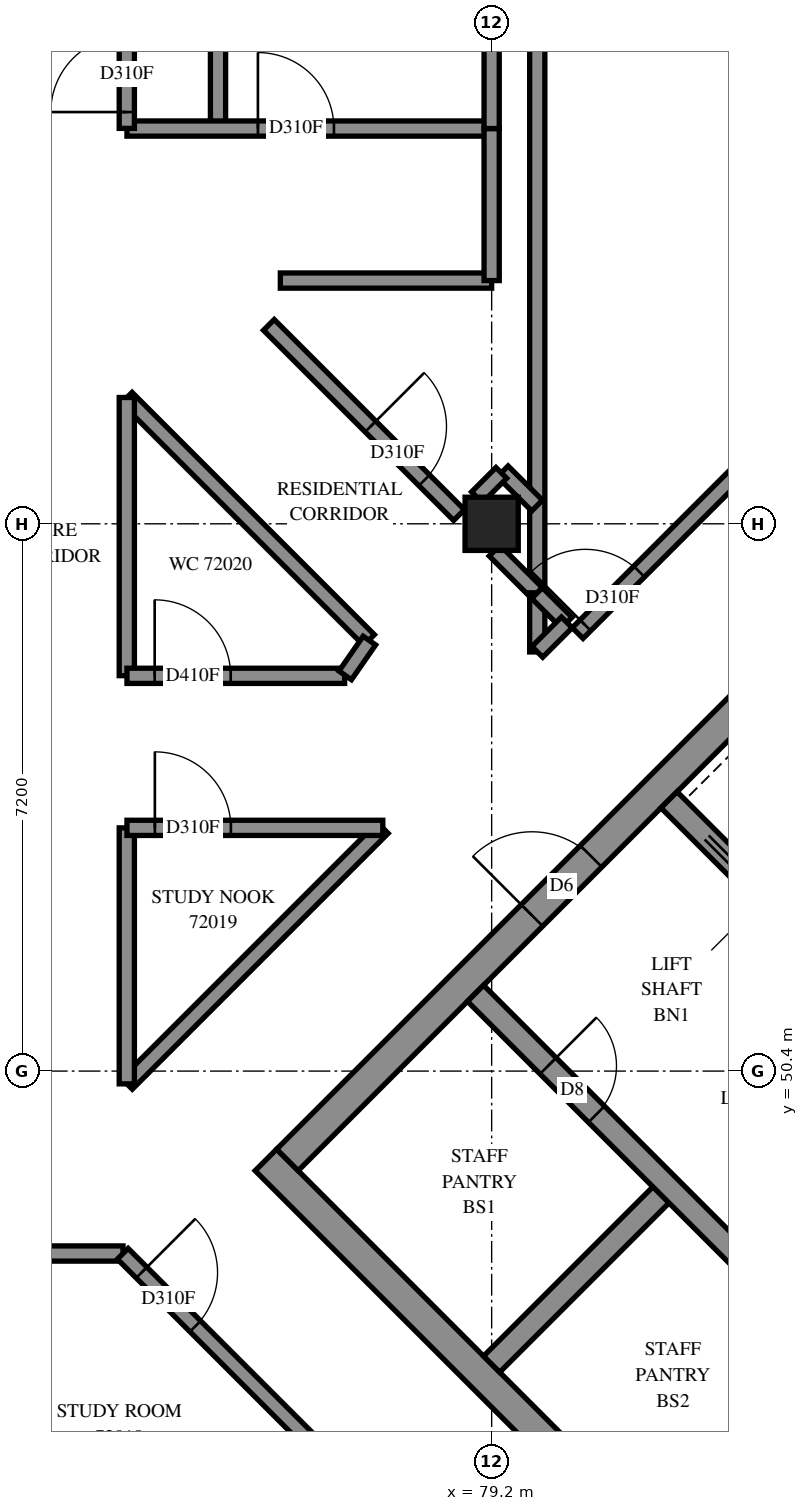
"""IFC4 building model, lengths in metres.
Left out: names, types, materials, properties, quantities, classifications, styles, units other than length and angle.
Written with IfcOpenShell. Run it as: python <this file> out.ifc"""

import sys

from ifc_helpers import new_model, si_unit, direction, frame, frame_2d, origin, origin_2d, place, context, subcontext, project, spatial, rectangle, extrude, element, fill, save


model = new_model("IFC4")
c1 = context("Model", 3, precision=1e-05, world=origin(), true_north=direction((0.0, 1.0)))
c2 = subcontext(c1, "Body", "Model", "MODEL_VIEW")
j1 = project(units=[si_unit("LENGTHUNIT", "METRE"), si_unit("PLANEANGLEUNIT", "RADIAN")], contexts=[c1])
p1 = place(None, origin())
s1 = spatial("IfcSite", under=j1, at=p1, CompositionType="ELEMENT")
p2 = place(p1, origin())
s2 = spatial("IfcBuilding", under=s1, at=p2, CompositionType="ELEMENT")
p3 = place(p2, frame((0.0, 0.0, 264.2)))
s3 = spatial("IfcBuildingStorey", under=s2, at=p3, CompositionType="ELEMENT", Elevation=264.2)
p4 = place(p3, frame((79.2, 57.6, 0.0), z_axis=(0.0, 0.0, 1.0), x_axis=(1.0, 0.0, 0.0)))
e1 = element("IfcColumn", 1, at=p4, inside=s3, PredefinedType="COLUMN", context=c2, shape_type="SweptSolid", body=[
    extrude(rectangle(XDim=0.7, YDim=0.7, at=origin_2d()), origin(), (0.0, 0.0, 1.0), 3.1),
])
p5 = place(p3, frame((76.23, 49.231, -0.3), z_axis=(0.0, 0.0, 1.0), x_axis=(0.7071034917, -0.7071100706, 0.0)))
e2 = element("IfcWall", 2, at=p5, inside=s3, PredefinedType="SHEAR", context=c2, shape_type="SweptSolid", body=[
    extrude(rectangle(XDim=15.2, YDim=0.4, at=frame_2d((7.6, 0.0))), origin(), (0.0, 0.0, 1.0), 2.7),
])
p6 = place(p3, frame((76.513, 49.231, -0.3), z_axis=(0.0, 0.0, 1.0), x_axis=(0.7071067812, 0.7071067812, 0.0)))
e3 = element("IfcWall", 3, at=p6, inside=s3, PredefinedType="SHEAR", context=c2, shape_type="SweptSolid", body=[
    extrude(rectangle(XDim=14.4, YDim=0.4, at=frame_2d((7.2, 0.0))), origin(), (0.0, 0.0, 1.0), 2.7),
])
p7 = place(p6, frame((4.55, 0.0, 0.3)))
e4 = element("IfcOpeningElement", 4, at=p7, cuts=e3, PredefinedType="OPENING", context=c2, shape_type="SweptSolid", body=[
    extrude(rectangle(XDim=1.1, YDim=2.1, at=frame_2d((0.55, 1.05))), frame((0.0, 0.21, 0.0), z_axis=(0.0, -1.0, 0.0), x_axis=(1.0, 0.0, 0.0)), (0.0, 0.0, 1.0), 0.42),
])
p8 = place(p6, frame((11.35, 0.0, 0.3)))
e5 = element("IfcOpeningElement", 5, at=p8, cuts=e3, PredefinedType="OPENING", context=c2, shape_type="SweptSolid", body=[
    extrude(rectangle(XDim=1.1, YDim=2.1, at=frame_2d((0.55, 1.05))), frame((0.0, 0.21, 0.0), z_axis=(0.0, -1.0, 0.0), x_axis=(1.0, 0.0, 0.0)), (0.0, 0.0, 1.0), 0.42),
])
p9 = place(p3, frame((79.2, 46.544, 0.0), z_axis=(0.0, 0.0, 1.0), x_axis=(0.7071219326, 0.7070916295, 0.0)))
e6 = element("IfcWall", 6, at=p9, inside=s3, PredefinedType="SOLIDWALL", context=c2, shape_type="SweptSolid", body=[
    extrude(rectangle(XDim=3.3, YDim=0.3, at=frame_2d((1.65, 0.0))), origin(), (0.0, 0.0, 1.0), 3.1),
])
p10 = place(p3, frame((81.746, 43.999, 0.0), z_axis=(0.0, 0.0, 1.0), x_axis=(0.7071067812, 0.7071067812, 0.0)))
e7 = element("IfcWall", 7, at=p10, inside=s3, PredefinedType="SOLIDWALL", context=c2, shape_type="SweptSolid", body=[
    extrude(rectangle(XDim=3.3, YDim=0.3, at=frame_2d((1.65, 0.0))), origin(), (0.0, 0.0, 1.0), 3.1),
])
p11 = place(p3, frame((78.988, 51.423, 0.0), z_axis=(0.0, 0.0, 1.0), x_axis=(0.7071067812, -0.7071067812, 0.0)))
e8 = element("IfcWall", 8, at=p11, inside=s3, PredefinedType="SOLIDWALL", context=c2, shape_type="SweptSolid", body=[
    extrude(rectangle(XDim=14.4, YDim=0.3, at=frame_2d((7.2, 0.0))), origin(), (0.0, 0.0, 1.0), 3.1),
])
p12 = place(p11, frame((1.35, 0.0, 0.0)))
e9 = element("IfcOpeningElement", 9, at=p12, cuts=e8, PredefinedType="OPENING", context=c2, shape_type="SweptSolid", body=[
    extrude(rectangle(XDim=0.9, YDim=2.1, at=frame_2d((0.45, 1.05))), frame((0.0, 0.16, 0.0), z_axis=(0.0, -1.0, 0.0), x_axis=(1.0, 0.0, 0.0)), (0.0, 0.0, 1.0), 0.32),
])
p13 = place(p11, frame((4.95, 0.0, 0.0)))
e10 = element("IfcOpeningElement", 10, at=p13, cuts=e8, PredefinedType="OPENING", context=c2, shape_type="SweptSolid", body=[
    extrude(rectangle(XDim=0.9, YDim=2.1, at=frame_2d((0.45, 1.05))), frame((0.0, 0.16, 0.0), z_axis=(0.0, -1.0, 0.0), x_axis=(1.0, 0.0, 0.0)), (0.0, 0.0, 1.0), 0.32),
])
p14 = place(p11, frame((8.55, 0.0, 0.0)))
e11 = element("IfcOpeningElement", 11, at=p14, cuts=e8, PredefinedType="OPENING", context=c2, shape_type="SweptSolid", body=[
    extrude(rectangle(XDim=0.9, YDim=2.1, at=frame_2d((0.45, 1.05))), frame((0.0, 0.16, 0.0), z_axis=(0.0, -1.0, 0.0), x_axis=(1.0, 0.0, 0.0)), (0.0, 0.0, 1.0), 0.32),
])
p15 = place(p11, frame((12.05, 0.0, 0.0)))
e12 = element("IfcOpeningElement", 12, at=p15, cuts=e8, PredefinedType="OPENING", context=c2, shape_type="SweptSolid", body=[
    extrude(rectangle(XDim=1.1, YDim=2.1, at=frame_2d((0.55, 1.05))), frame((0.0, 0.16, 0.0), z_axis=(0.0, -1.0, 0.0), x_axis=(1.0, 0.0, 0.0)), (0.0, 0.0, 1.0), 0.32),
])
p16 = place(p3, frame((81.534, 53.969, 0.0), z_axis=(0.0, 0.0, 1.0), x_axis=(0.707103309, -0.7071102534, 0.0)))
e13 = element("IfcWall", 13, at=p16, inside=s3, PredefinedType="SOLIDWALL", context=c2, shape_type="SweptSolid", body=[
    extrude(rectangle(XDim=14.4, YDim=0.3, at=frame_2d((7.2, 0.0))), origin(), (0.0, 0.0, 1.0), 3.1),
])
p17 = place(p16, frame((8.55, 0.0, 0.0)))
e14 = element("IfcOpeningElement", 14, at=p17, cuts=e13, PredefinedType="OPENING", context=c2, shape_type="SweptSolid", body=[
    extrude(rectangle(XDim=0.9, YDim=2.1, at=frame_2d((0.45, 1.05))), frame((0.0, 0.16, 0.0), z_axis=(0.0, -1.0, 0.0), x_axis=(1.0, 0.0, 0.0)), (0.0, 0.0, 1.0), 0.32),
])
p18 = place(p16, frame((1.25, 0.0, 0.0)))
e15 = element("IfcOpeningElement", 15, at=p18, cuts=e13, PredefinedType="OPENING", context=c2, shape_type="SweptSolid", body=[
    extrude(rectangle(XDim=1.1, YDim=2.1, at=frame_2d((0.55, 1.05))), frame((0.0, 0.16, 0.0), z_axis=(0.0, -1.0, 0.0), x_axis=(1.0, 0.0, 0.0)), (0.0, 0.0, 1.0), 0.32),
])
p19 = place(p16, frame((4.85, 0.0, 0.0)))
e16 = element("IfcOpeningElement", 16, at=p19, cuts=e13, PredefinedType="OPENING", context=c2, shape_type="SweptSolid", body=[
    extrude(rectangle(XDim=1.1, YDim=2.1, at=frame_2d((0.55, 1.05))), frame((0.0, 0.16, 0.0), z_axis=(0.0, -1.0, 0.0), x_axis=(1.0, 0.0, 0.0)), (0.0, 0.0, 1.0), 0.32),
])
p20 = place(p16, frame((12.05, 0.0, 0.0)))
e17 = element("IfcOpeningElement", 17, at=p20, cuts=e13, PredefinedType="OPENING", context=c2, shape_type="SweptSolid", body=[
    extrude(rectangle(XDim=1.1, YDim=2.1, at=frame_2d((0.55, 1.05))), frame((0.0, 0.16, 0.0), z_axis=(0.0, -1.0, 0.0), x_axis=(1.0, 0.0, 0.0)), (0.0, 0.0, 1.0), 0.32),
])
p21 = place(p3, frame((55.2, 48.0, 0.0), z_axis=(0.0, 0.0, 1.0), x_axis=(1.0, 0.0, 0.0)))
e18 = element("IfcWall", 18, at=p21, inside=s3, PredefinedType="PARTITIONING", context=c2, shape_type="SweptSolid", body=[
    extrude(rectangle(XDim=19.15, YDim=0.2, at=frame_2d((9.575, 0.0))), origin(), (0.0, 0.0, 1.0), 3.1),
])
p22 = place(p21, frame((4.475, 0.0, 0.0)))
e19 = element("IfcOpeningElement", 19, at=p22, cuts=e18, PredefinedType="OPENING", context=c2, shape_type="SweptSolid", body=[
    extrude(rectangle(XDim=1.0, YDim=2.1, at=frame_2d((0.5, 1.05))), frame((0.0, 0.11, 0.0), z_axis=(0.0, -1.0, 0.0), x_axis=(1.0, 0.0, 0.0)), (0.0, 0.0, 1.0), 0.22),
])
p23 = place(p21, frame((8.338, 0.0, 0.0)))
e20 = element("IfcOpeningElement", 20, at=p23, cuts=e18, PredefinedType="OPENING", context=c2, shape_type="SweptSolid", body=[
    extrude(rectangle(XDim=1.0, YDim=2.1, at=frame_2d((0.5, 1.05))), frame((0.0, 0.11, 0.0), z_axis=(0.0, -1.0, 0.0), x_axis=(1.0, 0.0, 0.0)), (0.0, 0.0, 1.0), 0.22),
])
p24 = place(p21, frame((13.707, 0.0, 0.0)))
e21 = element("IfcOpeningElement", 21, at=p24, cuts=e18, PredefinedType="OPENING", context=c2, shape_type="SweptSolid", body=[
    extrude(rectangle(XDim=1.0, YDim=2.1, at=frame_2d((0.5, 1.05))), frame((0.0, 0.11, 0.0), z_axis=(0.0, -1.0, 0.0), x_axis=(1.0, 0.0, 0.0)), (0.0, 0.0, 1.0), 0.22),
])
p25 = place(p3, frame((79.8, 56.692, 0.0), z_axis=(0.0, 0.0, 1.0), x_axis=(0.0, 1.0, 0.0)))
e22 = element("IfcWall", 22, at=p25, inside=s3, PredefinedType="PARTITIONING", context=c2, shape_type="SweptSolid", body=[
    extrude(rectangle(XDim=16.308, YDim=0.2, at=frame_2d((8.154, 0.0))), origin(), (0.0, 0.0, 1.0), 3.1),
])
p26 = place(p3, frame((75.6, 62.8, 0.0), z_axis=(0.0, 0.0, 1.0), x_axis=(0.0, 1.0, 0.0)))
e23 = element("IfcWall", 23, at=p26, inside=s3, PredefinedType="PARTITIONING", context=c2, shape_type="SweptSolid", body=[
    extrude(rectangle(XDim=10.036, YDim=0.2, at=frame_2d((5.018, 0.0))), origin(), (0.0, 0.0, 1.0), 3.1),
])
p27 = place(p3, frame((80.332, 56.163, 0.0), z_axis=(0.0, 0.0, 1.0), x_axis=(0.7071067812, 0.7071067812, 0.0)))
e24 = element("IfcWall", 24, at=p27, inside=s3, PredefinedType="PARTITIONING", context=c2, shape_type="SweptSolid", body=[
    extrude(rectangle(XDim=9.198, YDim=0.2, at=frame_2d((4.599, 0.0))), origin(), (0.0, 0.0, 1.0), 3.1),
])
p28 = place(p27, frame((0.144, 0.0, 0.0)))
e25 = element("IfcOpeningElement", 25, at=p28, cuts=e24, PredefinedType="OPENING", context=c2, shape_type="SweptSolid", body=[
    extrude(rectangle(XDim=1.0, YDim=2.1, at=frame_2d((0.5, 1.05))), frame((0.0, 0.11, 0.0), z_axis=(0.0, -1.0, 0.0), x_axis=(1.0, 0.0, 0.0)), (0.0, 0.0, 1.0), 0.22),
])
p29 = place(p3, frame((74.402, 62.8, 0.0), z_axis=(0.0, 0.0, 1.0), x_axis=(1.0, 0.0, 0.0)))
e26 = element("IfcWall", 26, at=p29, inside=s3, PredefinedType="PARTITIONING", context=c2, shape_type="SweptSolid", body=[
    extrude(rectangle(XDim=4.798, YDim=0.2, at=frame_2d((2.399, 0.0))), origin(), (0.0, 0.0, 1.0), 3.1),
])
p30 = place(p29, frame((1.723, 0.0, 0.0)))
e27 = element("IfcOpeningElement", 27, at=p30, cuts=e26, PredefinedType="OPENING", context=c2, shape_type="SweptSolid", body=[
    extrude(rectangle(XDim=1.0, YDim=2.1, at=frame_2d((0.5, 1.05))), frame((0.0, 0.11, 0.0), z_axis=(0.0, -1.0, 0.0), x_axis=(1.0, 0.0, 0.0)), (0.0, 0.0, 1.0), 0.22),
])
p31 = place(p3, frame((74.401, 50.233, 0.0), z_axis=(0.0, 0.0, 1.0), x_axis=(0.7071067812, 0.7071067812, 0.0)))
e28 = element("IfcWall", 28, at=p31, inside=s3, PredefinedType="PARTITIONING", context=c2, shape_type="SweptSolid", body=[
    extrude(rectangle(XDim=4.76, YDim=0.2, at=frame_2d((2.38, 0.0))), origin(), (0.0, 0.0, 1.0), 3.1),
])
p32 = place(p3, frame((74.347, 47.997, 0.0), z_axis=(0.0, 0.0, 1.0), x_axis=(0.7071067812, -0.7071067812, 0.0)))
e29 = element("IfcWall", 29, at=p32, inside=s3, PredefinedType="PARTITIONING", context=c2, shape_type="SweptSolid", body=[
    extrude(rectangle(XDim=4.596, YDim=0.2, at=frame_2d((2.298, 0.0))), origin(), (0.0, 0.0, 1.0), 3.1),
])
p33 = place(p32, frame((0.35, 0.0, 0.0)))
e30 = element("IfcOpeningElement", 30, at=p33, cuts=e29, PredefinedType="OPENING", context=c2, shape_type="SweptSolid", body=[
    extrude(rectangle(XDim=1.0, YDim=2.1, at=frame_2d((0.5, 1.05))), frame((0.0, 0.11, 0.0), z_axis=(0.0, -1.0, 0.0), x_axis=(1.0, 0.0, 0.0)), (0.0, 0.0, 1.0), 0.22),
])
p34 = place(p3, frame((74.399, 59.259, 0.0), z_axis=(0.0, 0.0, 1.0), x_axis=(0.7071067812, -0.7071067812, 0.0)))
e31 = element("IfcWall", 31, at=p34, inside=s3, PredefinedType="PARTITIONING", context=c2, shape_type="SweptSolid", body=[
    extrude(rectangle(XDim=4.508, YDim=0.2, at=frame_2d((2.254, 0.0))), origin(), (0.0, 0.0, 1.0), 3.1),
])
p35 = place(p3, frame((74.4, 62.802, 0.0), z_axis=(0.0, 0.0, 1.0), x_axis=(0.0, 1.0, 0.0)))
e32 = element("IfcWall", 32, at=p35, inside=s3, PredefinedType="PARTITIONING", context=c2, shape_type="SweptSolid", body=[
    extrude(rectangle(XDim=4.398, YDim=0.2, at=frame_2d((2.199, 0.0))), origin(), (0.0, 0.0, 1.0), 3.1),
])
p36 = place(p35, frame((0.215, 0.0, 0.0)))
e33 = element("IfcOpeningElement", 33, at=p36, cuts=e32, PredefinedType="OPENING", context=c2, shape_type="SweptSolid", body=[
    extrude(rectangle(XDim=1.0, YDim=2.1, at=frame_2d((0.5, 1.05))), frame((0.0, 0.11, 0.0), z_axis=(0.0, -1.0, 0.0), x_axis=(1.0, 0.0, 0.0)), (0.0, 0.0, 1.0), 0.22),
])
p37 = place(p3, frame((74.4, 55.602, 0.0), z_axis=(0.0, 0.0, 1.0), x_axis=(0.0, 1.0, 0.0)))
e34 = element("IfcWall", 34, at=p37, inside=s3, PredefinedType="PARTITIONING", context=c2, shape_type="SweptSolid", body=[
    extrude(rectangle(XDim=3.66, YDim=0.2, at=frame_2d((1.83, 0.0))), origin(), (0.0, 0.0, 1.0), 3.1),
])
p38 = place(p3, frame((76.269, 60.217, 0.0), z_axis=(0.0, 0.0, 1.0), x_axis=(0.7071067812, -0.7071067812, 0.0)))
e35 = element("IfcWall", 35, at=p38, inside=s3, PredefinedType="PARTITIONING", context=c2, shape_type="SweptSolid", body=[
    extrude(rectangle(XDim=3.538, YDim=0.2, at=frame_2d((1.769, 0.0))), origin(), (0.0, 0.0, 1.0), 3.1),
])
p39 = place(p38, frame((1.891, 0.0, 0.0)))
e36 = element("IfcOpeningElement", 36, at=p39, cuts=e35, PredefinedType="OPENING", context=c2, shape_type="SweptSolid", body=[
    extrude(rectangle(XDim=1.0, YDim=2.1, at=frame_2d((0.5, 1.05))), frame((0.0, 0.11, 0.0), z_axis=(0.0, -1.0, 0.0), x_axis=(1.0, 0.0, 0.0)), (0.0, 0.0, 1.0), 0.22),
])
p40 = place(p3, frame((74.4, 50.232, 0.0), z_axis=(0.0, 0.0, 1.0), x_axis=(0.0, 1.0, 0.0)))
e37 = element("IfcWall", 37, at=p40, inside=s3, PredefinedType="PARTITIONING", context=c2, shape_type="SweptSolid", body=[
    extrude(rectangle(XDim=3.368, YDim=0.2, at=frame_2d((1.684, 0.0))), origin(), (0.0, 0.0, 1.0), 3.1),
])
p41 = place(p3, frame((74.402, 53.6, 0.0), z_axis=(0.0, 0.0, 1.0), x_axis=(1.0, 0.0, 0.0)))
e38 = element("IfcWall", 38, at=p41, inside=s3, PredefinedType="PARTITIONING", context=c2, shape_type="SweptSolid", body=[
    extrude(rectangle(XDim=3.366, YDim=0.2, at=frame_2d((1.683, 0.0))), origin(), (0.0, 0.0, 1.0), 3.1),
])
p42 = place(p41, frame((0.367, 0.0, 0.0)))
e39 = element("IfcOpeningElement", 39, at=p42, cuts=e38, PredefinedType="OPENING", context=c2, shape_type="SweptSolid", body=[
    extrude(rectangle(XDim=1.0, YDim=2.1, at=frame_2d((0.5, 1.05))), frame((0.0, 0.11, 0.0), z_axis=(0.0, -1.0, 0.0), x_axis=(1.0, 0.0, 0.0)), (0.0, 0.0, 1.0), 0.22),
])
p43 = place(p3, frame((74.402, 55.6, 0.0), z_axis=(0.0, 0.0, 1.0), x_axis=(1.0, 0.0, 0.0)))
e40 = element("IfcWall", 40, at=p43, inside=s3, PredefinedType="PARTITIONING", context=c2, shape_type="SweptSolid", body=[
    extrude(rectangle(XDim=2.864, YDim=0.2, at=frame_2d((1.432, 0.0))), origin(), (0.0, 0.0, 1.0), 3.1),
])
p44 = place(p43, frame((0.365, 0.0, 0.0)))
e41 = element("IfcOpeningElement", 41, at=p44, cuts=e40, PredefinedType="OPENING", context=c2, shape_type="SweptSolid", body=[
    extrude(rectangle(XDim=1.0, YDim=2.1, at=frame_2d((0.5, 1.05))), frame((0.0, 0.11, 0.0), z_axis=(0.0, -1.0, 0.0), x_axis=(1.0, 0.0, 0.0)), (0.0, 0.0, 1.0), 0.22),
])
p45 = place(p3, frame((76.42, 60.8, 0.0), z_axis=(0.0, 0.0, 1.0), x_axis=(1.0, 0.0, 0.0)))
e42 = element("IfcWall", 42, at=p45, inside=s3, PredefinedType="PARTITIONING", context=c2, shape_type="SweptSolid", body=[
    extrude(rectangle(XDim=2.78, YDim=0.2, at=frame_2d((1.39, 0.0))), origin(), (0.0, 0.0, 1.0), 3.1),
])
p46 = place(p3, frame((79.2, 60.8, 0.0), z_axis=(0.0, 0.0, 1.0), x_axis=(0.0, 1.0, 0.0)))
e43 = element("IfcWall", 43, at=p46, inside=s3, PredefinedType="PARTITIONING", context=c2, shape_type="SweptSolid", body=[
    extrude(rectangle(XDim=2.0, YDim=0.2, at=frame_2d((1.0, 0.0))), origin(), (0.0, 0.0, 1.0), 3.1),
])
p47 = place(p3, frame((79.2, 62.8, 0.0), z_axis=(0.0, 0.0, 1.0), x_axis=(0.0, 1.0, 0.0)))
e44 = element("IfcWall", 44, at=p47, inside=s3, PredefinedType="PARTITIONING", context=c2, shape_type="SweptSolid", body=[
    extrude(rectangle(XDim=1.546, YDim=0.2, at=frame_2d((0.773, 0.0))), origin(), (0.0, 0.0, 1.0), 3.1),
])
p48 = place(p3, frame((79.239, 57.247, 0.0), z_axis=(0.0, 0.0, 1.0), x_axis=(0.7071067812, -0.7071067812, 0.0)))
e45 = element("IfcWall", 45, at=p48, inside=s3, PredefinedType="PARTITIONING", context=c2, shape_type="SweptSolid", body=[
    extrude(rectangle(XDim=0.789, YDim=0.2, at=frame_2d((0.395, 0.0))), origin(), (0.0, 0.0, 1.0), 3.1),
])
p49 = place(p3, frame((79.8, 55.914, 0.0), z_axis=(0.0, 0.0, 1.0), x_axis=(0.0, 1.0, 0.0)))
e46 = element("IfcWall", 46, at=p49, inside=s3, PredefinedType="PARTITIONING", context=c2, shape_type="SweptSolid", body=[
    extrude(rectangle(XDim=0.778, YDim=0.2, at=frame_2d((0.389, 0.0))), origin(), (0.0, 0.0, 1.0), 3.1),
])
p50 = place(p3, frame((79.346, 58.29, 0.0), z_axis=(0.0, 0.0, 1.0), x_axis=(0.7086729034, -0.7055371826, 0.0)))
e47 = element("IfcWall", 47, at=p50, inside=s3, PredefinedType="PARTITIONING", context=c2, shape_type="SweptSolid", body=[
    extrude(rectangle(XDim=0.638, YDim=0.2, at=frame_2d((0.319, 0.0))), origin(), (0.0, 0.0, 1.0), 3.1),
])
p51 = place(p3, frame((77.273, 55.606, 0.0), z_axis=(0.0, 0.0, 1.0), x_axis=(0.5703285869, 0.821416644, 0.0)))
e48 = element("IfcWall", 48, at=p51, inside=s3, PredefinedType="PARTITIONING", context=c2, shape_type="SweptSolid", body=[
    extrude(rectangle(XDim=0.558, YDim=0.2, at=frame_2d((0.279, 0.0))), origin(), (0.0, 0.0, 1.0), 3.1),
])
p52 = place(p3, frame((79.797, 56.689, 0.0), z_axis=(0.0, 0.0, 1.0), x_axis=(0.7071067812, -0.7071067812, 0.0)))
e49 = element("IfcWall", 49, at=p52, inside=s3, PredefinedType="PARTITIONING", context=c2, shape_type="SweptSolid", body=[
    extrude(rectangle(XDim=0.551, YDim=0.2, at=frame_2d((0.276, 0.0))), origin(), (0.0, 0.0, 1.0), 3.1),
])
p53 = place(p3, frame((79.801, 55.915, 0.0), z_axis=(0.0, 0.0, 1.0), x_axis=(0.7071067812, 0.7071067812, 0.0)))
e50 = element("IfcWall", 50, at=p53, inside=s3, PredefinedType="PARTITIONING", context=c2, shape_type="SweptSolid", body=[
    extrude(rectangle(XDim=0.549, YDim=0.2, at=frame_2d((0.274, 0.0))), origin(), (0.0, 0.0, 1.0), 3.1),
])
p54 = place(p3, frame((79.007, 57.949, 0.0), z_axis=(0.0, 0.0, 1.0), x_axis=(0.7071067812, 0.7071067812, 0.0)))
e51 = element("IfcWall", 51, at=p54, inside=s3, PredefinedType="PARTITIONING", context=c2, shape_type="SweptSolid", body=[
    extrude(rectangle(XDim=0.454, YDim=0.2, at=frame_2d((0.227, 0.0))), origin(), (0.0, 0.0, 1.0), 3.1),
])
p55 = place(p7, origin())
e52 = element("IfcDoor", 52, at=p55, inside=s3, OperationType="DOUBLE_DOOR_SINGLE_SWING", PredefinedType="DOOR", context=c2, shape_type="SweptSolid", body=[
    extrude(rectangle(XDim=1.1, YDim=2.1, at=frame_2d((0.55, 1.05))), frame((0.0, 0.025, 0.0), z_axis=(0.0, -1.0, 0.0), x_axis=(1.0, 0.0, 0.0)), (0.0, 0.0, 1.0), 0.05),
])
fill(e4, e52)
p56 = place(p12, origin())
e53 = element("IfcDoor", 53, at=p56, inside=s3, OperationType="SINGLE_SWING_LEFT", PredefinedType="DOOR", context=c2, shape_type="SweptSolid", body=[
    extrude(rectangle(XDim=0.9, YDim=2.1, at=frame_2d((0.45, 1.05))), frame((0.0, 0.025, 0.0), z_axis=(0.0, -1.0, 0.0), x_axis=(1.0, 0.0, 0.0)), (0.0, 0.0, 1.0), 0.05),
])
fill(e9, e53)
p57 = place(p33, origin())
e54 = element("IfcDoor", 54, at=p57, inside=s3, OperationType="SINGLE_SWING_LEFT", PredefinedType="DOOR", context=c2, shape_type="SweptSolid", body=[
    extrude(rectangle(XDim=1.0, YDim=2.1, at=frame_2d((0.5, 1.05))), frame((0.0, 0.025, 0.0), z_axis=(0.0, -1.0, 0.0), x_axis=(1.0, 0.0, 0.0)), (0.0, 0.0, 1.0), 0.05),
])
fill(e30, e54)
p58 = place(p42, origin())
e55 = element("IfcDoor", 55, at=p58, inside=s3, OperationType="SINGLE_SWING_RIGHT", PredefinedType="DOOR", context=c2, shape_type="SweptSolid", body=[
    extrude(rectangle(XDim=1.0, YDim=2.1, at=frame_2d((0.5, 1.05))), frame((0.0, 0.025, 0.0), z_axis=(0.0, -1.0, 0.0), x_axis=(1.0, 0.0, 0.0)), (0.0, 0.0, 1.0), 0.05),
])
fill(e39, e55)
p59 = place(p44, origin())
e56 = element("IfcDoor", 56, at=p59, inside=s3, OperationType="SINGLE_SWING_LEFT", PredefinedType="DOOR", context=c2, shape_type="SweptSolid", body=[
    extrude(rectangle(XDim=1.0, YDim=2.1, at=frame_2d((0.5, 1.05))), frame((0.0, 0.025, 0.0), z_axis=(0.0, -1.0, 0.0), x_axis=(1.0, 0.0, 0.0)), (0.0, 0.0, 1.0), 0.05),
])
fill(e41, e56)
p60 = place(p36, origin())
e57 = element("IfcDoor", 57, at=p60, inside=s3, OperationType="SINGLE_SWING_RIGHT", PredefinedType="DOOR", context=c2, shape_type="SweptSolid", body=[
    extrude(rectangle(XDim=1.0, YDim=2.1, at=frame_2d((0.5, 1.05))), frame((0.0, 0.025, 0.0), z_axis=(0.0, -1.0, 0.0), x_axis=(1.0, 0.0, 0.0)), (0.0, 0.0, 1.0), 0.05),
])
fill(e33, e57)
p61 = place(p30, origin())
e58 = element("IfcDoor", 58, at=p61, inside=s3, OperationType="SINGLE_SWING_LEFT", PredefinedType="DOOR", context=c2, shape_type="SweptSolid", body=[
    extrude(rectangle(XDim=1.0, YDim=2.1, at=frame_2d((0.5, 1.05))), frame((0.0, 0.025, 0.0), z_axis=(0.0, -1.0, 0.0), x_axis=(1.0, 0.0, 0.0)), (0.0, 0.0, 1.0), 0.05),
])
fill(e27, e58)
p62 = place(p39, origin())
e59 = element("IfcDoor", 59, at=p62, inside=s3, OperationType="SINGLE_SWING_LEFT", PredefinedType="DOOR", context=c2, shape_type="SweptSolid", body=[
    extrude(rectangle(XDim=1.0, YDim=2.1, at=frame_2d((0.5, 1.05))), frame((0.0, 0.025, 0.0), z_axis=(0.0, -1.0, 0.0), x_axis=(1.0, 0.0, 0.0)), (0.0, 0.0, 1.0), 0.05),
])
fill(e36, e59)
p63 = place(p28, origin())
e60 = element("IfcDoor", 60, at=p63, inside=s3, OperationType="SINGLE_SWING_RIGHT", PredefinedType="DOOR", context=c2, shape_type="SweptSolid", body=[
    extrude(rectangle(XDim=1.0, YDim=2.1, at=frame_2d((0.5, 1.05))), frame((0.0, 0.025, 0.0), z_axis=(0.0, -1.0, 0.0), x_axis=(1.0, 0.0, 0.0)), (0.0, 0.0, 1.0), 0.05),
])
fill(e25, e60)
save(model, sys.argv[1])
